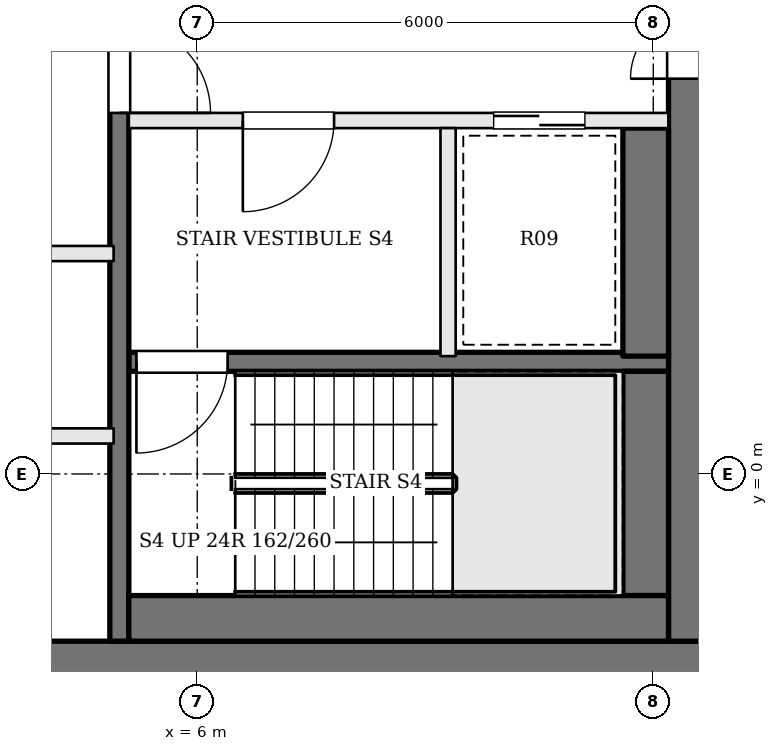
"""IFC4 building model, lengths in metres.
Left out: names, types, materials, properties, quantities, classifications, styles, units other than length and angle.
Written with IfcOpenShell. Run it as: python <this file> out.ifc"""

import sys

from ifc_helpers import new_model, si_unit, direction, frame, frame_2d, origin, place, context, subcontext, project, spatial, rectangle, extrude, element, fill, save


model = new_model("IFC4")
c1 = context("Model", 3, precision=1e-05, world=origin(), true_north=direction((0.0, 1.0)))
c2 = subcontext(c1, "Body", "Model", "MODEL_VIEW")
j1 = project(units=[si_unit("LENGTHUNIT", "METRE"), si_unit("PLANEANGLEUNIT", "RADIAN")], contexts=[c1])
p1 = place(None, origin())
s1 = spatial("IfcSite", under=j1, at=p1, CompositionType="ELEMENT")
p2 = place(p1, origin())
s2 = spatial("IfcBuilding", under=s1, at=p2, CompositionType="ELEMENT")
p3 = place(p2, frame((0.0, 0.0, 213.0)))
s3 = spatial("IfcBuildingStorey", under=s2, at=p3, CompositionType="ELEMENT", Elevation=213.0)
p4 = place(p3, frame((-13.0, -2.6, 0.0), z_axis=(0.0, 0.0, 1.0), x_axis=(1.0, 0.0, 0.0)))
e1 = element("IfcWall", 1, at=p4, inside=s3, PredefinedType="SHEAR", context=c2, shape_type="SweptSolid", body=[
    extrude(rectangle(XDim=26.0, YDim=0.8, at=frame_2d((13.0, 0.0))), origin(), (0.0, 0.0, 1.0), 3.9),
])
p5 = place(p4, frame((8.925, 0.0, 0.0)))
e2 = element("IfcOpeningElement", 2, at=p5, cuts=e1, PredefinedType="OPENING", context=c2, shape_type="SweptSolid", body=[
    extrude(rectangle(XDim=0.9, YDim=2.1, at=frame_2d((0.45, 1.05))), frame((0.0, 0.41, 0.0), z_axis=(0.0, -1.0, 0.0), x_axis=(1.0, 0.0, 0.0)), (0.0, 0.0, 1.0), 0.82),
])
p6 = place(p4, frame((11.475, 0.0, 0.0)))
e3 = element("IfcOpeningElement", 3, at=p6, cuts=e1, PredefinedType="OPENING", context=c2, shape_type="SweptSolid", body=[
    extrude(rectangle(XDim=0.9, YDim=2.1, at=frame_2d((0.45, 1.05))), frame((0.0, 0.41, 0.0), z_axis=(0.0, -1.0, 0.0), x_axis=(1.0, 0.0, 0.0)), (0.0, 0.0, 1.0), 0.82),
])
p7 = place(p4, frame((13.6, 0.0, 0.0)))
e4 = element("IfcOpeningElement", 4, at=p7, cuts=e1, PredefinedType="OPENING", context=c2, shape_type="SweptSolid", body=[
    extrude(rectangle(XDim=1.0, YDim=2.1, at=frame_2d((0.5, 1.05))), frame((0.0, 0.41, 0.0), z_axis=(0.0, -1.0, 0.0), x_axis=(1.0, 0.0, 0.0)), (0.0, 0.0, 1.0), 0.82),
])
p8 = place(p4, frame((15.95, 0.0, 0.0)))
e5 = element("IfcOpeningElement", 5, at=p8, cuts=e1, PredefinedType="OPENING", context=c2, shape_type="SweptSolid", body=[
    extrude(rectangle(XDim=1.0, YDim=2.1, at=frame_2d((0.5, 1.05))), frame((0.0, 0.41, 0.0), z_axis=(0.0, -1.0, 0.0), x_axis=(1.0, 0.0, 0.0)), (0.0, 0.0, 1.0), 0.82),
])
p9 = place(p3, frame((12.6, -2.2, 0.0), z_axis=(0.0, 0.0, 1.0), x_axis=(0.0, 1.0, 0.0)))
e6 = element("IfcWall", 6, at=p9, inside=s3, PredefinedType="SHEAR", context=c2, shape_type="SweptSolid", body=[
    extrude(rectangle(XDim=13.4, YDim=0.8, at=frame_2d((6.7, 0.0))), origin(), (0.0, 0.0, 1.0), 3.9),
])
p10 = place(p9, frame((7.4, 0.0, 0.0)))
e7 = element("IfcOpeningElement", 7, at=p10, cuts=e6, PredefinedType="OPENING", context=c2, shape_type="SweptSolid", body=[
    extrude(rectangle(XDim=1.8, YDim=2.1, at=frame_2d((0.9, 1.05))), frame((0.0, 0.41, 0.0), z_axis=(0.0, -1.0, 0.0), x_axis=(1.0, 0.0, 0.0)), (0.0, 0.0, 1.0), 0.82),
])
p11 = place(p3, frame((12.2, 4.65, 0.0), z_axis=(0.0, 0.0, 1.0), x_axis=(-1.0, 0.0, 0.0)))
e8 = element("IfcWall", 8, at=p11, inside=s3, PredefinedType="SOLIDWALL", context=c2, shape_type="SweptSolid", body=[
    extrude(rectangle(XDim=7.1, YDim=0.2, at=frame_2d((3.55, 0.0))), origin(), (0.0, 0.0, 1.0), 3.6),
])
p12 = place(p11, frame((4.4, 0.0, 0.0)))
e9 = element("IfcOpeningElement", 9, at=p12, cuts=e8, PredefinedType="OPENING", context=c2, shape_type="SweptSolid", body=[
    extrude(rectangle(XDim=1.2, YDim=2.1, at=frame_2d((0.6, 1.05))), frame((0.0, 0.11, 0.0), z_axis=(0.0, -1.0, 0.0), x_axis=(1.0, 0.0, 0.0)), (0.0, 0.0, 1.0), 0.22),
])
p13 = place(p11, frame((1.1, 0.0, 0.0)))
e10 = element("IfcOpeningElement", 10, at=p13, cuts=e8, PredefinedType="OPENING", context=c2, shape_type="SweptSolid", body=[
    extrude(rectangle(XDim=1.2, YDim=2.1, at=frame_2d((0.6, 1.05))), frame((0.0, 0.11, 0.0), z_axis=(0.0, -1.0, 0.0), x_axis=(1.0, 0.0, 0.0)), (0.0, 0.0, 1.0), 0.22),
])
p14 = place(p3, frame((12.2, 1.475, 0.0), z_axis=(0.0, 0.0, 1.0), x_axis=(-1.0, 0.0, 0.0)))
e11 = element("IfcWall", 11, at=p14, inside=s3, PredefinedType="SOLIDWALL", context=c2, shape_type="SweptSolid", body=[
    extrude(rectangle(XDim=7.1, YDim=0.25, at=frame_2d((3.55, 0.0))), origin(), (0.0, 0.0, 1.0), 3.6),
])
p15 = place(p14, frame((5.8, 0.0, 0.0)))
e12 = element("IfcOpeningElement", 12, at=p15, cuts=e11, PredefinedType="OPENING", context=c2, shape_type="SweptSolid", body=[
    extrude(rectangle(XDim=1.2, YDim=2.1, at=frame_2d((0.6, 1.05))), frame((0.0, 0.135, 0.0), z_axis=(0.0, -1.0, 0.0), x_axis=(1.0, 0.0, 0.0)), (0.0, 0.0, 1.0), 0.27),
])
p16 = place(p3, frame((9.3, 4.55, 0.0), z_axis=(0.0, 0.0, 1.0), x_axis=(0.0, -1.0, 0.0)))
e13 = element("IfcWall", 13, at=p16, inside=s3, PredefinedType="SOLIDWALL", context=c2, shape_type="SweptSolid", body=[
    extrude(rectangle(XDim=3.0, YDim=0.2, at=frame_2d((1.5, 0.0))), origin(), (0.0, 0.0, 1.0), 3.6),
])
p17 = place(p3, frame((4.975, 11.2, 0.0), z_axis=(0.0, 0.0, 1.0), x_axis=(0.0, -1.0, 0.0)))
e14 = element("IfcWall", 14, at=p17, inside=s3, PredefinedType="SOLIDWALL", context=c2, shape_type="SweptSolid", body=[
    extrude(rectangle(XDim=13.4, YDim=0.25, at=frame_2d((6.7, 0.0))), origin(), (0.0, 0.0, 1.0), 3.6),
])
p18 = place(p17, frame((5.25, 0.0, 0.0)))
e15 = element("IfcOpeningElement", 15, at=p18, cuts=e14, PredefinedType="OPENING", context=c2, shape_type="SweptSolid", body=[
    extrude(rectangle(XDim=1.2, YDim=2.1, at=frame_2d((0.6, 1.05))), frame((0.0, 0.135, 0.0), z_axis=(0.0, -1.0, 0.0), x_axis=(1.0, 0.0, 0.0)), (0.0, 0.0, 1.0), 0.27),
])
p19 = place(p3, frame((11.9, 4.55, 0.0), z_axis=(0.0, 0.0, 1.0), x_axis=(0.0, -1.0, 0.0)))
e16 = element("IfcWall", 16, at=p19, inside=s3, PredefinedType="SOLIDWALL", context=c2, shape_type="SweptSolid", body=[
    extrude(rectangle(XDim=3.0, YDim=0.6, at=frame_2d((1.5, 0.0))), origin(), (0.0, 0.0, 1.0), 3.6),
])
p20 = place(p3, frame((11.9, 1.35, 0.0), z_axis=(0.0, 0.0, 1.0), x_axis=(0.0, -1.0, 0.0)))
e17 = element("IfcWall", 17, at=p20, inside=s3, PredefinedType="SOLIDWALL", context=c2, shape_type="SweptSolid", body=[
    extrude(rectangle(XDim=2.95, YDim=0.6, at=frame_2d((1.475, 0.0))), origin(), (0.0, 0.0, 1.0), 3.6),
])
p21 = place(p3, frame((12.2, -1.9, 0.0), z_axis=(0.0, 0.0, 1.0), x_axis=(-1.0, 0.0, 0.0)))
e18 = element("IfcWall", 18, at=p21, inside=s3, PredefinedType="SOLIDWALL", context=c2, shape_type="SweptSolid", body=[
    extrude(rectangle(XDim=7.1, YDim=0.6, at=frame_2d((3.55, 0.0))), origin(), (0.0, 0.0, 1.0), 3.6),
])
p22 = place(p3, frame((-4.9, 0.5, 0.0), z_axis=(0.0, 0.0, 1.0), x_axis=(1.0, 0.0, 0.0)))
e19 = element("IfcWall", 19, at=p22, inside=s3, PredefinedType="SOLIDWALL", context=c2, shape_type="SweptSolid", body=[
    extrude(rectangle(XDim=9.8, YDim=0.2, at=frame_2d((4.9, 0.0))), origin(), (0.0, 0.0, 1.0), 3.6),
])
p23 = place(p3, frame((-4.9, 2.9, 0.0), z_axis=(0.0, 0.0, 1.0), x_axis=(1.0, 0.0, 0.0)))
e20 = element("IfcWall", 20, at=p23, inside=s3, PredefinedType="SOLIDWALL", context=c2, shape_type="SweptSolid", body=[
    extrude(rectangle(XDim=9.8, YDim=0.2, at=frame_2d((4.9, 0.0))), origin(), (0.0, 0.0, 1.0), 3.6),
])
p24 = place(p23, frame((0.675, 0.0, 0.0)))
e21 = element("IfcOpeningElement", 21, at=p24, cuts=e20, PredefinedType="OPENING", context=c2, shape_type="SweptSolid", body=[
    extrude(rectangle(XDim=1.1, YDim=2.1, at=frame_2d((0.55, 1.05))), frame((0.0, 0.11, 0.0), z_axis=(0.0, -1.0, 0.0), x_axis=(1.0, 0.0, 0.0)), (0.0, 0.0, 1.0), 0.22),
])
p25 = place(p23, frame((2.613, 0.0, 0.0)))
e22 = element("IfcOpeningElement", 22, at=p25, cuts=e20, PredefinedType="OPENING", context=c2, shape_type="SweptSolid", body=[
    extrude(rectangle(XDim=0.9, YDim=2.1, at=frame_2d((0.45, 1.05))), frame((0.0, 0.11, 0.0), z_axis=(0.0, -1.0, 0.0), x_axis=(1.0, 0.0, 0.0)), (0.0, 0.0, 1.0), 0.22),
])
p26 = place(p23, frame((4.35, 0.0, 0.0)))
e23 = element("IfcOpeningElement", 23, at=p26, cuts=e20, PredefinedType="OPENING", context=c2, shape_type="SweptSolid", body=[
    extrude(rectangle(XDim=1.1, YDim=2.1, at=frame_2d((0.55, 1.05))), frame((0.0, 0.11, 0.0), z_axis=(0.0, -1.0, 0.0), x_axis=(1.0, 0.0, 0.0)), (0.0, 0.0, 1.0), 0.22),
])
p27 = place(p23, frame((7.463, 0.0, 0.0)))
e24 = element("IfcOpeningElement", 24, at=p27, cuts=e20, PredefinedType="OPENING", context=c2, shape_type="SweptSolid", body=[
    extrude(rectangle(XDim=1.0, YDim=2.1, at=frame_2d((0.5, 1.05))), frame((0.0, 0.11, 0.0), z_axis=(0.0, -1.0, 0.0), x_axis=(1.0, 0.0, 0.0)), (0.0, 0.0, 1.0), 0.22),
])
p28 = place(p10, origin())
e25 = element("IfcDoor", 25, at=p28, inside=s3, OperationType="DOUBLE_DOOR_SINGLE_SWING", PredefinedType="DOOR", context=c2, shape_type="SweptSolid", body=[
    extrude(rectangle(XDim=1.8, YDim=2.1, at=frame_2d((0.9, 1.05))), frame((0.0, 0.025, 0.0), z_axis=(0.0, -1.0, 0.0), x_axis=(1.0, 0.0, 0.0)), (0.0, 0.0, 1.0), 0.05),
])
fill(e7, e25)
p29 = place(p18, origin())
e26 = element("IfcDoor", 26, at=p29, inside=s3, OperationType="SINGLE_SWING_RIGHT", PredefinedType="DOOR", context=c2, shape_type="SweptSolid", body=[
    extrude(rectangle(XDim=1.2, YDim=2.1, at=frame_2d((0.6, 1.05))), frame((0.0, 0.025, 0.0), z_axis=(0.0, -1.0, 0.0), x_axis=(1.0, 0.0, 0.0)), (0.0, 0.0, 1.0), 0.05),
])
fill(e15, e26)
p30 = place(p12, origin())
e27 = element("IfcDoor", 27, at=p30, inside=s3, OperationType="SINGLE_SWING_RIGHT", PredefinedType="DOOR", context=c2, shape_type="SweptSolid", body=[
    extrude(rectangle(XDim=1.2, YDim=2.1, at=frame_2d((0.6, 1.05))), frame((0.0, 0.025, 0.0), z_axis=(0.0, -1.0, 0.0), x_axis=(1.0, 0.0, 0.0)), (0.0, 0.0, 1.0), 0.05),
])
fill(e9, e27)
p31 = place(p15, origin())
e28 = element("IfcDoor", 28, at=p31, inside=s3, OperationType="SINGLE_SWING_RIGHT", PredefinedType="DOOR", context=c2, shape_type="SweptSolid", body=[
    extrude(rectangle(XDim=1.2, YDim=2.1, at=frame_2d((0.6, 1.05))), frame((0.0, 0.025, 0.0), z_axis=(0.0, -1.0, 0.0), x_axis=(1.0, 0.0, 0.0)), (0.0, 0.0, 1.0), 0.05),
])
fill(e12, e28)
p32 = place(p13, origin())
e29 = element("IfcDoor", 29, at=p32, inside=s3, OperationType="SLIDING_TO_RIGHT", PredefinedType="DOOR", context=c2, shape_type="SweptSolid", body=[
    extrude(rectangle(XDim=1.2, YDim=2.1, at=frame_2d((0.6, 1.05))), frame((0.0, 0.025, 0.0), z_axis=(0.0, -1.0, 0.0), x_axis=(1.0, 0.0, 0.0)), (0.0, 0.0, 1.0), 0.05),
])
fill(e10, e29)
save(model, sys.argv[1])
